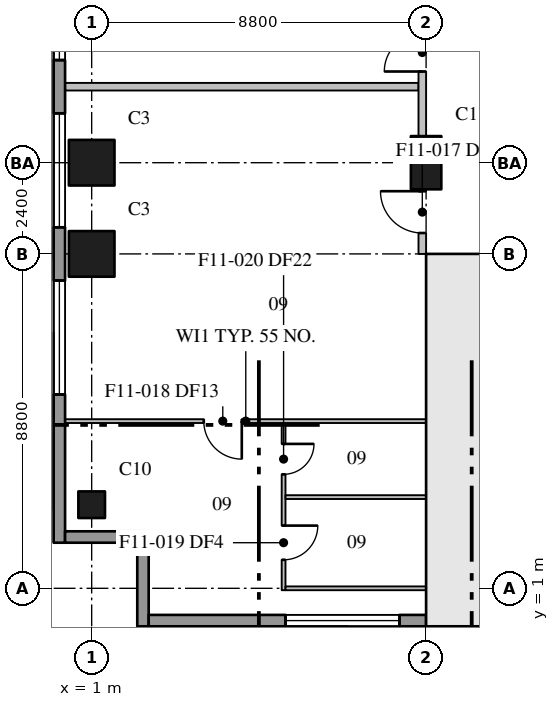
"""IFC4 building model, lengths in metres.
Left out: names, types, materials, properties, quantities, classifications, styles, units other than length and angle.
Written with IfcOpenShell. Run it as: python <this file> out.ifc"""

import sys

from ifc_helpers import new_model, si_unit, direction, frame, frame_2d, origin, origin_2d, place, context, subcontext, project, spatial, rectangle, extrude, element, fill, save


model = new_model("IFC4")
c1 = context("Model", 3, precision=1e-05, world=origin(), true_north=direction((0.0, 1.0)))
c2 = subcontext(c1, "Body", "Model", "MODEL_VIEW")
j1 = project(units=[si_unit("LENGTHUNIT", "METRE"), si_unit("PLANEANGLEUNIT", "RADIAN")], contexts=[c1])
p1 = place(None, origin())
s1 = spatial("IfcSite", under=j1, at=p1, CompositionType="ELEMENT")
p2 = place(p1, origin())
s2 = spatial("IfcBuilding", under=s1, at=p2, CompositionType="ELEMENT")
p3 = place(p2, frame((0.0, 0.0, 111.1)))
s3 = spatial("IfcBuildingStorey", under=s2, at=p3, CompositionType="ELEMENT", Elevation=111.1)
p4 = place(p3, frame((1.0, 3.2, 0.0), z_axis=(0.0, 0.0, 1.0), x_axis=(1.0, 0.0, 0.0)))
e1 = element("IfcColumn", 1, at=p4, inside=s3, PredefinedType="COLUMN", context=c2, shape_type="SweptSolid", body=[
    extrude(rectangle(XDim=0.7, YDim=0.7, at=origin_2d()), origin(), (0.0, 0.0, 1.0), 3.7),
])
for number, where, z_axis, x_axis in (
    (2, (1.0, 9.8, 0.0), (0.0, 0.0, 1.0), (1.0, 0.0, 0.0)),
    (3, (1.0, 12.2, 0.0), (0.0, 0.0, 1.0), (1.0, 0.0, 0.0)),
):
    element("IfcColumn", number, at=place(p3, frame(where, z_axis=z_axis, x_axis=x_axis)), inside=s3, PredefinedType="COLUMN", context=c2, shape_type="SweptSolid", body=[
        extrude(rectangle(XDim=1.2, YDim=1.2, at=origin_2d()), origin(), (0.0, 0.0, 1.0), 3.7),
    ])
p5 = place(p3, frame((9.8, 12.2, 0.0), z_axis=(0.0, 0.0, 1.0), x_axis=(0.0, 1.0, 0.0)))
e4 = element("IfcColumn", 4, at=p5, inside=s3, PredefinedType="COLUMN", context=c2, shape_type="SweptSolid", body=[
    extrude(rectangle(XDim=1.4, YDim=0.8, at=origin_2d()), origin(), (0.0, 0.0, 1.0), 3.7),
])
p6 = place(p3, frame((9.8, 0.8, 0.0), z_axis=(0.0, 0.0, 1.0), x_axis=(1.0, 0.0, 0.0)))
e5 = element("IfcWall", 5, at=p6, inside=s3, PredefinedType="SHEAR", context=c2, shape_type="SweptSolid", body=[
    extrude(rectangle(XDim=35.2, YDim=0.8, at=frame_2d((17.6, 0.0))), origin(), (0.0, 0.0, 1.0), 3.7),
])
p7 = place(p3, frame((10.6, 1.2, 0.0), z_axis=(0.0, 0.0, 1.0), x_axis=(0.0, 1.0, 0.0)))
e6 = element("IfcWall", 6, at=p7, inside=s3, PredefinedType="SHEAR", context=c2, shape_type="SweptSolid", body=[
    extrude(rectangle(XDim=8.6, YDim=0.8, at=frame_2d((4.3, 0.0))), origin(), (0.0, 0.0, 1.0), 3.7),
])
p8 = place(p3, frame((9.8, 9.6, 0.0), z_axis=(0.0, 0.0, 1.0), x_axis=(1.0, 0.0, 0.0)))
e7 = element("IfcWall", 7, at=p8, inside=s3, PredefinedType="SHEAR", context=c2, shape_type="SweptSolid", body=[
    extrude(rectangle(XDim=4.3, YDim=0.4, at=frame_2d((2.15, 0.0))), origin(), (0.0, 0.0, 1.0), 3.7),
])
p9 = place(p8, frame((2.05, 0.0, 0.0)))
e8 = element("IfcOpeningElement", 8, at=p9, cuts=e7, PredefinedType="OPENING", context=c2, shape_type="SweptSolid", body=[
    extrude(rectangle(XDim=1.2, YDim=2.1, at=frame_2d((0.6, 1.05))), frame((0.0, 0.21, 0.0), z_axis=(0.0, -1.0, 0.0), x_axis=(1.0, 0.0, 0.0)), (0.0, 0.0, 1.0), 0.42),
])
p10 = place(p3, frame((0.15, 78.7, 0.0), z_axis=(0.0, 0.0, 1.0), x_axis=(0.0, -1.0, 0.0)))
e9 = element("IfcWall", 9, at=p10, inside=s3, PredefinedType="STANDARD", context=c2, shape_type="SweptSolid", body=[
    extrude(rectangle(XDim=76.5, YDim=0.3, at=frame_2d((38.25, 0.0))), origin(), (0.0, 0.0, 1.0), 3.4),
])
p11 = place(p10, frame((3.6, 0.0, 0.75)))
e10 = element("IfcOpeningElement", 10, at=p11, cuts=e9, PredefinedType="OPENING", context=c2, shape_type="SweptSolid", body=[
    extrude(rectangle(XDim=3.0, YDim=2.3, at=frame_2d((1.5, 1.15))), frame((0.0, 0.16, 0.0), z_axis=(0.0, -1.0, 0.0), x_axis=(1.0, 0.0, 0.0)), (0.0, 0.0, 1.0), 0.32),
])
p12 = place(p10, frame((8.0, 0.0, 0.75)))
e11 = element("IfcOpeningElement", 11, at=p12, cuts=e9, PredefinedType="OPENING", context=c2, shape_type="SweptSolid", body=[
    extrude(rectangle(XDim=3.0, YDim=2.3, at=frame_2d((1.5, 1.15))), frame((0.0, 0.16, 0.0), z_axis=(0.0, -1.0, 0.0), x_axis=(1.0, 0.0, 0.0)), (0.0, 0.0, 1.0), 0.32),
])
p13 = place(p10, frame((12.4, 0.0, 0.75)))
e12 = element("IfcOpeningElement", 12, at=p13, cuts=e9, PredefinedType="OPENING", context=c2, shape_type="SweptSolid", body=[
    extrude(rectangle(XDim=3.0, YDim=2.3, at=frame_2d((1.5, 1.15))), frame((0.0, 0.16, 0.0), z_axis=(0.0, -1.0, 0.0), x_axis=(1.0, 0.0, 0.0)), (0.0, 0.0, 1.0), 0.32),
])
p14 = place(p10, frame((16.8, 0.0, 0.75)))
e13 = element("IfcOpeningElement", 13, at=p14, cuts=e9, PredefinedType="OPENING", context=c2, shape_type="SweptSolid", body=[
    extrude(rectangle(XDim=3.0, YDim=2.3, at=frame_2d((1.5, 1.15))), frame((0.0, 0.16, 0.0), z_axis=(0.0, -1.0, 0.0), x_axis=(1.0, 0.0, 0.0)), (0.0, 0.0, 1.0), 0.32),
])
p15 = place(p10, frame((21.2, 0.0, 0.75)))
e14 = element("IfcOpeningElement", 14, at=p15, cuts=e9, PredefinedType="OPENING", context=c2, shape_type="SweptSolid", body=[
    extrude(rectangle(XDim=3.0, YDim=2.3, at=frame_2d((1.5, 1.15))), frame((0.0, 0.16, 0.0), z_axis=(0.0, -1.0, 0.0), x_axis=(1.0, 0.0, 0.0)), (0.0, 0.0, 1.0), 0.32),
])
p16 = place(p10, frame((25.6, 0.0, 0.75)))
e15 = element("IfcOpeningElement", 15, at=p16, cuts=e9, PredefinedType="OPENING", context=c2, shape_type="SweptSolid", body=[
    extrude(rectangle(XDim=3.0, YDim=2.3, at=frame_2d((1.5, 1.15))), frame((0.0, 0.16, 0.0), z_axis=(0.0, -1.0, 0.0), x_axis=(1.0, 0.0, 0.0)), (0.0, 0.0, 1.0), 0.32),
])
p17 = place(p10, frame((30.0, 0.0, 0.75)))
e16 = element("IfcOpeningElement", 16, at=p17, cuts=e9, PredefinedType="OPENING", context=c2, shape_type="SweptSolid", body=[
    extrude(rectangle(XDim=3.0, YDim=2.3, at=frame_2d((1.5, 1.15))), frame((0.0, 0.16, 0.0), z_axis=(0.0, -1.0, 0.0), x_axis=(1.0, 0.0, 0.0)), (0.0, 0.0, 1.0), 0.32),
])
p18 = place(p10, frame((34.4, 0.0, 0.75)))
e17 = element("IfcOpeningElement", 17, at=p18, cuts=e9, PredefinedType="OPENING", context=c2, shape_type="SweptSolid", body=[
    extrude(rectangle(XDim=3.0, YDim=2.3, at=frame_2d((1.5, 1.15))), frame((0.0, 0.16, 0.0), z_axis=(0.0, -1.0, 0.0), x_axis=(1.0, 0.0, 0.0)), (0.0, 0.0, 1.0), 0.32),
])
p19 = place(p10, frame((38.8, 0.0, 0.75)))
e18 = element("IfcOpeningElement", 18, at=p19, cuts=e9, PredefinedType="OPENING", context=c2, shape_type="SweptSolid", body=[
    extrude(rectangle(XDim=3.0, YDim=2.3, at=frame_2d((1.5, 1.15))), frame((0.0, 0.16, 0.0), z_axis=(0.0, -1.0, 0.0), x_axis=(1.0, 0.0, 0.0)), (0.0, 0.0, 1.0), 0.32),
])
p20 = place(p10, frame((43.2, 0.0, 0.75)))
e19 = element("IfcOpeningElement", 19, at=p20, cuts=e9, PredefinedType="OPENING", context=c2, shape_type="SweptSolid", body=[
    extrude(rectangle(XDim=3.0, YDim=2.3, at=frame_2d((1.5, 1.15))), frame((0.0, 0.16, 0.0), z_axis=(0.0, -1.0, 0.0), x_axis=(1.0, 0.0, 0.0)), (0.0, 0.0, 1.0), 0.32),
])
p21 = place(p10, frame((47.6, 0.0, 0.75)))
e20 = element("IfcOpeningElement", 20, at=p21, cuts=e9, PredefinedType="OPENING", context=c2, shape_type="SweptSolid", body=[
    extrude(rectangle(XDim=3.0, YDim=2.3, at=frame_2d((1.5, 1.15))), frame((0.0, 0.16, 0.0), z_axis=(0.0, -1.0, 0.0), x_axis=(1.0, 0.0, 0.0)), (0.0, 0.0, 1.0), 0.32),
])
p22 = place(p10, frame((52.0, 0.0, 0.75)))
e21 = element("IfcOpeningElement", 21, at=p22, cuts=e9, PredefinedType="OPENING", context=c2, shape_type="SweptSolid", body=[
    extrude(rectangle(XDim=3.0, YDim=2.3, at=frame_2d((1.5, 1.15))), frame((0.0, 0.16, 0.0), z_axis=(0.0, -1.0, 0.0), x_axis=(1.0, 0.0, 0.0)), (0.0, 0.0, 1.0), 0.32),
])
p23 = place(p10, frame((56.4, 0.0, 0.75)))
e22 = element("IfcOpeningElement", 22, at=p23, cuts=e9, PredefinedType="OPENING", context=c2, shape_type="SweptSolid", body=[
    extrude(rectangle(XDim=3.0, YDim=2.3, at=frame_2d((1.5, 1.15))), frame((0.0, 0.16, 0.0), z_axis=(0.0, -1.0, 0.0), x_axis=(1.0, 0.0, 0.0)), (0.0, 0.0, 1.0), 0.32),
])
p24 = place(p10, frame((60.8, 0.0, 0.75)))
e23 = element("IfcOpeningElement", 23, at=p24, cuts=e9, PredefinedType="OPENING", context=c2, shape_type="SweptSolid", body=[
    extrude(rectangle(XDim=3.0, YDim=2.3, at=frame_2d((1.5, 1.15))), frame((0.0, 0.16, 0.0), z_axis=(0.0, -1.0, 0.0), x_axis=(1.0, 0.0, 0.0)), (0.0, 0.0, 1.0), 0.32),
])
p25 = place(p10, frame((65.2, 0.0, 0.75)))
e24 = element("IfcOpeningElement", 24, at=p25, cuts=e9, PredefinedType="OPENING", context=c2, shape_type="SweptSolid", body=[
    extrude(rectangle(XDim=3.0, YDim=2.3, at=frame_2d((1.5, 1.15))), frame((0.0, 0.16, 0.0), z_axis=(0.0, -1.0, 0.0), x_axis=(1.0, 0.0, 0.0)), (0.0, 0.0, 1.0), 0.32),
])
p26 = place(p10, frame((69.6, 0.0, 0.75)))
e25 = element("IfcOpeningElement", 25, at=p26, cuts=e9, PredefinedType="OPENING", context=c2, shape_type="SweptSolid", body=[
    extrude(rectangle(XDim=3.0, YDim=2.3, at=frame_2d((1.5, 1.15))), frame((0.0, 0.16, 0.0), z_axis=(0.0, -1.0, 0.0), x_axis=(1.0, 0.0, 0.0)), (0.0, 0.0, 1.0), 0.32),
])
for number, where, z_axis, x_axis in (
    (26, (0.3, 2.35, 0.0), (0.0, 0.0, 1.0), (1.0, 0.0, 0.0)),
    (27, (2.35, 2.2, 0.0), (0.0, 0.0, 1.0), (0.0, -1.0, 0.0)),
):
    element("IfcWall", number, at=place(p3, frame(where, z_axis=z_axis, x_axis=x_axis)), inside=s3, PredefinedType="STANDARD", context=c2, shape_type="SweptSolid", body=[
        extrude(rectangle(XDim=2.2, YDim=0.3, at=frame_2d((1.1, 0.0))), origin(), (0.0, 0.0, 1.0), 3.4),
    ])
p27 = place(p3, frame((2.5, 0.15, 0.0), z_axis=(0.0, 0.0, 1.0), x_axis=(1.0, 0.0, 0.0)))
e28 = element("IfcWall", 28, at=p27, inside=s3, PredefinedType="STANDARD", context=c2, shape_type="SweptSolid", body=[
    extrude(rectangle(XDim=7.3, YDim=0.3, at=frame_2d((3.65, 0.0))), origin(), (0.0, 0.0, 1.0), 3.4),
])
p28 = place(p27, frame((3.6, 0.0, 0.75)))
e29 = element("IfcOpeningElement", 29, at=p28, cuts=e28, PredefinedType="OPENING", context=c2, shape_type="SweptSolid", body=[
    extrude(rectangle(XDim=3.0, YDim=2.3, at=frame_2d((1.5, 1.15))), frame((0.0, 0.16, 0.0), z_axis=(0.0, -1.0, 0.0), x_axis=(1.0, 0.0, 0.0)), (0.0, 0.0, 1.0), 0.32),
])
p29 = place(p3, frame((9.7, 9.8, 0.0), z_axis=(0.0, 0.0, 1.0), x_axis=(0.0, 1.0, 0.0)))
e30 = element("IfcWall", 30, at=p29, inside=s3, PredefinedType="PARTITIONING", context=c2, shape_type="SweptSolid", body=[
    extrude(rectangle(XDim=1.7, YDim=0.2, at=frame_2d((0.85, 0.0))), origin(), (0.0, 0.0, 1.0), 3.4),
])
p30 = place(p29, frame((0.55, 0.0, 0.0)))
e31 = element("IfcOpeningElement", 31, at=p30, cuts=e30, PredefinedType="OPENING", context=c2, shape_type="SweptSolid", body=[
    extrude(rectangle(XDim=1.1, YDim=2.1, at=frame_2d((0.55, 1.05))), frame((0.0, 0.11, 0.0), z_axis=(0.0, -1.0, 0.0), x_axis=(1.0, 0.0, 0.0)), (0.0, 0.0, 1.0), 0.22),
])
p31 = place(p3, frame((9.7, 12.9, 0.0), z_axis=(0.0, 0.0, 1.0), x_axis=(0.0, 1.0, 0.0)))
e32 = element("IfcWall", 32, at=p31, inside=s3, PredefinedType="PARTITIONING", context=c2, shape_type="SweptSolid", body=[
    extrude(rectangle(XDim=7.5, YDim=0.2, at=frame_2d((3.75, 0.0))), origin(), (0.0, 0.0, 1.0), 3.4),
])
p32 = place(p31, frame((1.7, 0.0, 0.0)))
e33 = element("IfcOpeningElement", 33, at=p32, cuts=e32, PredefinedType="OPENING", context=c2, shape_type="SweptSolid", body=[
    extrude(rectangle(XDim=1.0, YDim=2.1, at=frame_2d((0.5, 1.05))), frame((0.0, 0.11, 0.0), z_axis=(0.0, -1.0, 0.0), x_axis=(1.0, 0.0, 0.0)), (0.0, 0.0, 1.0), 0.22),
])
p33 = place(p3, frame((0.31, 14.2, 0.0), z_axis=(0.0, 0.0, 1.0), x_axis=(1.0, 0.0, 0.0)))
e34 = element("IfcWall", 34, at=p33, inside=s3, PredefinedType="PARTITIONING", context=c2, shape_type="SweptSolid", body=[
    extrude(rectangle(XDim=9.29, YDim=0.2, at=frame_2d((4.645, 0.0))), origin(), (0.0, 0.0, 1.0), 3.4),
])
p34 = place(p3, frame((6.05, 5.35, 0.0), z_axis=(0.0, 0.0, 1.0), x_axis=(0.0, -1.0, 0.0)))
e35 = element("IfcWall", 35, at=p34, inside=s3, PredefinedType="PARTITIONING", context=c2, shape_type="SweptSolid", body=[
    extrude(rectangle(XDim=4.4, YDim=0.1, at=frame_2d((2.2, 0.0))), origin(), (0.0, 0.0, 1.0), 3.4),
])
p35 = place(p34, frame((2.7, 0.0, 0.0)))
e36 = element("IfcOpeningElement", 36, at=p35, cuts=e35, PredefinedType="OPENING", context=c2, shape_type="SweptSolid", body=[
    extrude(rectangle(XDim=0.9, YDim=2.1, at=frame_2d((0.45, 1.05))), frame((0.0, 0.06, 0.0), z_axis=(0.0, -1.0, 0.0), x_axis=(1.0, 0.0, 0.0)), (0.0, 0.0, 1.0), 0.12),
])
p36 = place(p34, frame((0.55, 0.0, 0.0)))
e37 = element("IfcOpeningElement", 37, at=p36, cuts=e35, PredefinedType="OPENING", context=c2, shape_type="SweptSolid", body=[
    extrude(rectangle(XDim=0.8, YDim=2.1, at=frame_2d((0.4, 1.05))), frame((0.0, 0.06, 0.0), z_axis=(0.0, -1.0, 0.0), x_axis=(1.0, 0.0, 0.0)), (0.0, 0.0, 1.0), 0.12),
])
p37 = place(p3, frame((9.8, 5.4, 0.0), z_axis=(0.0, 0.0, 1.0), x_axis=(-1.0, 0.0, 0.0)))
e38 = element("IfcWall", 38, at=p37, inside=s3, PredefinedType="PARTITIONING", context=c2, shape_type="SweptSolid", body=[
    extrude(rectangle(XDim=9.49, YDim=0.1, at=frame_2d((4.745, 0.0))), origin(), (0.0, 0.0, 1.0), 3.4),
])
p38 = place(p37, frame((4.85, 0.0, 0.0)))
e39 = element("IfcOpeningElement", 39, at=p38, cuts=e38, PredefinedType="OPENING", context=c2, shape_type="SweptSolid", body=[
    extrude(rectangle(XDim=1.0, YDim=2.1, at=frame_2d((0.5, 1.05))), frame((0.0, 0.06, 0.0), z_axis=(0.0, -1.0, 0.0), x_axis=(1.0, 0.0, 0.0)), (0.0, 0.0, 1.0), 0.12),
])
for number, where, z_axis, x_axis in (
    (40, (6.1, 1.0, 0.0), (0.0, 0.0, 1.0), (1.0, 0.0, 0.0)),
    (41, (6.1, 3.4, 0.0), (0.0, 0.0, 1.0), (1.0, 0.0, 0.0)),
):
    element("IfcWall", number, at=place(p3, frame(where, z_axis=z_axis, x_axis=x_axis)), inside=s3, PredefinedType="PARTITIONING", context=c2, shape_type="SweptSolid", body=[
        extrude(rectangle(XDim=3.7, YDim=0.1, at=frame_2d((1.85, 0.0))), origin(), (0.0, 0.0, 1.0), 3.4),
    ])
p39 = place(p24, origin())
e42 = element("IfcWindow", 42, at=p39, inside=s3, PartitioningType="SINGLE_PANEL", PredefinedType="WINDOW", context=c2, shape_type="SweptSolid", body=[
    extrude(rectangle(XDim=3.0, YDim=2.3, at=frame_2d((1.5, 1.15))), frame((0.0, 0.03, 0.0), z_axis=(0.0, -1.0, 0.0), x_axis=(1.0, 0.0, 0.0)), (0.0, 0.0, 1.0), 0.06),
])
fill(e23, e42)
p40 = place(p25, origin())
e43 = element("IfcWindow", 43, at=p40, inside=s3, PartitioningType="SINGLE_PANEL", PredefinedType="WINDOW", context=c2, shape_type="SweptSolid", body=[
    extrude(rectangle(XDim=3.0, YDim=2.3, at=frame_2d((1.5, 1.15))), frame((0.0, 0.03, 0.0), z_axis=(0.0, -1.0, 0.0), x_axis=(1.0, 0.0, 0.0)), (0.0, 0.0, 1.0), 0.06),
])
fill(e24, e43)
p41 = place(p26, origin())
e44 = element("IfcWindow", 44, at=p41, inside=s3, PartitioningType="SINGLE_PANEL", PredefinedType="WINDOW", context=c2, shape_type="SweptSolid", body=[
    extrude(rectangle(XDim=3.0, YDim=2.3, at=frame_2d((1.5, 1.15))), frame((0.0, 0.03, 0.0), z_axis=(0.0, -1.0, 0.0), x_axis=(1.0, 0.0, 0.0)), (0.0, 0.0, 1.0), 0.06),
])
fill(e25, e44)
p42 = place(p28, origin())
e45 = element("IfcWindow", 45, at=p42, inside=s3, PartitioningType="SINGLE_PANEL", PredefinedType="WINDOW", context=c2, shape_type="SweptSolid", body=[
    extrude(rectangle(XDim=3.0, YDim=2.3, at=frame_2d((1.5, 1.15))), frame((0.0, 0.03, 0.0), z_axis=(0.0, -1.0, 0.0), x_axis=(1.0, 0.0, 0.0)), (0.0, 0.0, 1.0), 0.06),
])
fill(e29, e45)
p43 = place(p30, origin())
e46 = element("IfcDoor", 46, at=p43, inside=s3, OperationType="SINGLE_SWING_RIGHT", PredefinedType="DOOR", context=c2, shape_type="SweptSolid", body=[
    extrude(rectangle(XDim=1.1, YDim=2.1, at=frame_2d((0.55, 1.05))), frame((0.0, 0.025, 0.0), z_axis=(0.0, -1.0, 0.0), x_axis=(1.0, 0.0, 0.0)), (0.0, 0.0, 1.0), 0.05),
])
fill(e31, e46)
p44 = place(p38, origin())
e47 = element("IfcDoor", 47, at=p44, inside=s3, OperationType="SINGLE_SWING_LEFT", PredefinedType="DOOR", context=c2, shape_type="SweptSolid", body=[
    extrude(rectangle(XDim=1.0, YDim=2.1, at=frame_2d((0.5, 1.05))), frame((0.0, 0.025, 0.0), z_axis=(0.0, -1.0, 0.0), x_axis=(1.0, 0.0, 0.0)), (0.0, 0.0, 1.0), 0.05),
])
fill(e39, e47)
p45 = place(p35, origin())
e48 = element("IfcDoor", 48, at=p45, inside=s3, OperationType="SINGLE_SWING_LEFT", PredefinedType="DOOR", context=c2, shape_type="SweptSolid", body=[
    extrude(rectangle(XDim=0.9, YDim=2.1, at=frame_2d((0.45, 1.05))), frame((0.0, 0.025, 0.0), z_axis=(0.0, -1.0, 0.0), x_axis=(1.0, 0.0, 0.0)), (0.0, 0.0, 1.0), 0.05),
])
fill(e36, e48)
p46 = place(p36, origin())
e49 = element("IfcDoor", 49, at=p46, inside=s3, OperationType="SINGLE_SWING_LEFT", PredefinedType="DOOR", context=c2, shape_type="SweptSolid", body=[
    extrude(rectangle(XDim=0.8, YDim=2.1, at=frame_2d((0.4, 1.05))), frame((0.0, 0.025, 0.0), z_axis=(0.0, -1.0, 0.0), x_axis=(1.0, 0.0, 0.0)), (0.0, 0.0, 1.0), 0.05),
])
fill(e37, e49)
p47 = place(p32, origin())
e50 = element("IfcDoor", 50, at=p47, inside=s3, OperationType="SINGLE_SWING_LEFT", PredefinedType="DOOR", context=c2, shape_type="SweptSolid", body=[
    extrude(rectangle(XDim=1.0, YDim=2.1, at=frame_2d((0.5, 1.05))), frame((0.0, 0.025, 0.0), z_axis=(0.0, -1.0, 0.0), x_axis=(1.0, 0.0, 0.0)), (0.0, 0.0, 1.0), 0.05),
])
fill(e33, e50)
save(model, sys.argv[1])
